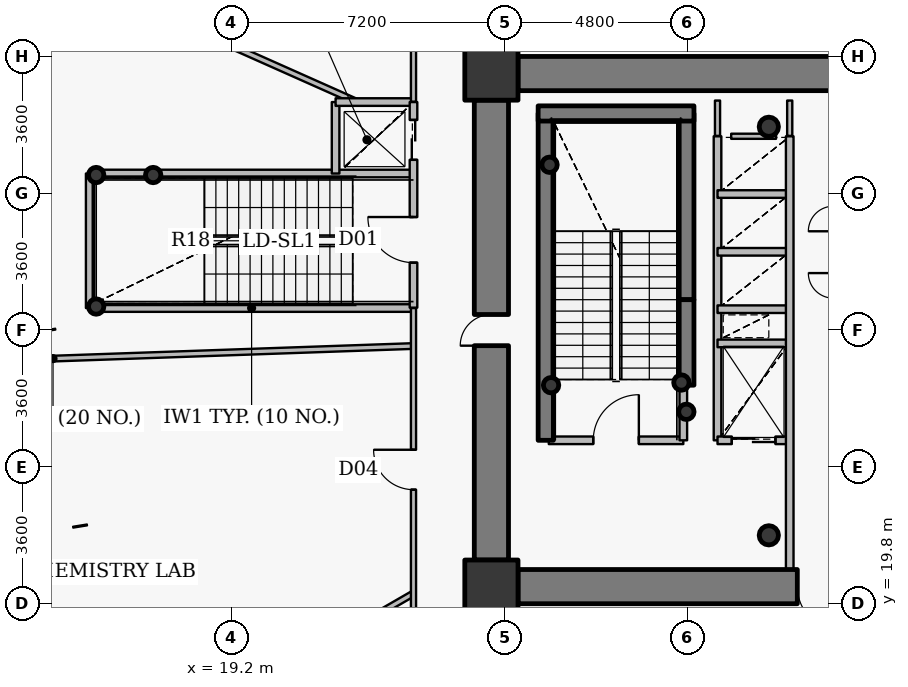
"""IFC4 building model, lengths in metres.
Left out: names, types, materials, properties, quantities, classifications, styles, units other than length and angle.
Written with IfcOpenShell. Run it as: python <this file> out.ifc"""

import sys

from ifc_helpers import new_model, si_unit, direction, frame, frame_2d, origin, origin_2d, place, context, subcontext, project, spatial, rectangle, hollow_circle, extrude, source, transform, mapped, element, fill, save


model = new_model("IFC4")
c1 = context("Model", 3, precision=1e-05, world=origin(), true_north=direction((0.0, 1.0)))
c2 = subcontext(c1, "Body", "Model", "MODEL_VIEW")
j1 = project(units=[si_unit("LENGTHUNIT", "METRE"), si_unit("PLANEANGLEUNIT", "RADIAN")], contexts=[c1])
p1 = place(None, origin())
s1 = spatial("IfcSite", under=j1, at=p1, CompositionType="ELEMENT")
p2 = place(p1, origin())
s2 = spatial("IfcBuilding", under=s1, at=p2, CompositionType="ELEMENT")
p3 = place(p2, frame((0.0, 0.0, 53.4)))
s3 = spatial("IfcBuildingStorey", under=s2, at=p3, CompositionType="ELEMENT", Elevation=53.4)
for number, where, z_axis, x_axis in (
    (1, (26.05, 20.25, 0.0), (0.0, 0.0, 1.0), (1.0, 0.0, 0.0)),
    (2, (26.05, 33.75, 0.0), (0.0, 0.0, 1.0), (1.0, 0.0, 0.0)),
):
    element("IfcColumn", number, at=place(p3, frame(where, z_axis=z_axis, x_axis=x_axis)), inside=s3, PredefinedType="COLUMN", context=c2, shape_type="SweptSolid", body=[
        extrude(rectangle(XDim=1.4, YDim=1.4, at=origin_2d()), origin(), (0.0, 0.0, 1.0), 4.2),
    ])
for number, where, z_axis, x_axis in (
    (3, (33.35, 21.6, 0.0), (0.0, 0.0, 1.0), (1.0, 0.0, 0.0)),
    (4, (33.35, 32.35, 0.0), (0.0, 0.0, 1.0), (1.0, 0.0, 0.0)),
):
    element("IfcColumn", number, at=place(p3, frame(where, z_axis=z_axis, x_axis=x_axis)), inside=s3, PredefinedType="COLUMN", context=c2, shape_type="SweptSolid", body=[
        extrude(hollow_circle(Radius=0.254, WallThickness=0.02, at=origin_2d()), origin(), (0.0, 0.0, 1.0), 4.2),
    ])
p4 = place(p3, frame((27.48, 24.1, 0.0), z_axis=(0.0, 0.0, 1.0), x_axis=(0.0, 1.0, 0.0)))
e5 = element("IfcWall", 5, at=p4, inside=s3, PredefinedType="SHEAR", context=c2, shape_type="SweptSolid", body=[
    extrude(rectangle(XDim=8.6, YDim=0.4, at=frame_2d((4.3, 0.0))), origin(), (0.0, 0.0, 1.0), 4.2),
])
p5 = place(p3, frame((31.18, 27.8, 0.0), z_axis=(0.0, 0.0, 1.0), x_axis=(0.0, 1.0, 0.0)))
e6 = element("IfcWall", 6, at=p5, inside=s3, PredefinedType="SHEAR", context=c2, shape_type="SweptSolid", body=[
    extrude(rectangle(XDim=4.9, YDim=0.4, at=frame_2d((2.45, 0.0))), origin(), (0.0, 0.0, 1.0), 4.2),
])
p6 = place(p3, frame((27.28, 32.7, 0.0), z_axis=(0.0, 0.0, 1.0), x_axis=(1.0, 0.0, 0.0)))
e7 = element("IfcWall", 7, at=p6, inside=s3, PredefinedType="SHEAR", context=c2, shape_type="SweptSolid", body=[
    extrude(rectangle(XDim=4.1, YDim=0.4, at=frame_2d((2.05, 0.0))), origin(), (0.0, 0.0, 1.0), 4.2),
])
for number, where, z_axis, x_axis in (
    (8, (27.58, 31.35, 0.0), (0.0, 0.0, 1.0), (1.0, 0.0, 0.0)),
    (9, (31.05, 25.62, 0.0), (0.0, 0.0, 1.0), (1.0, 0.0, 0.0)),
    (10, (31.18, 24.85, 0.0), (0.0, 0.0, 1.0), (1.0, 0.0, 0.0)),
    (11, (27.62, 25.55, 0.0), (0.0, 0.0, 1.0), (1.0, 0.0, 0.0)),
    (12, (15.65, 27.62, 0.0), (0.0, 0.0, 1.0), (1.0, 0.0, 0.0)),
    (13, (15.65, 31.08, 0.0), (0.0, 0.0, 1.0), (1.0, 0.0, 0.0)),
    (14, (17.15, 31.08, 0.0), (0.0, 0.0, 1.0), (1.0, 0.0, 0.0)),
):
    element("IfcColumn", number, at=place(p3, frame(where, z_axis=z_axis, x_axis=x_axis)), inside=s3, PredefinedType="COLUMN", context=c2, shape_type="SweptSolid", body=[
        extrude(hollow_circle(Radius=0.203, WallThickness=0.016, at=origin_2d()), origin(), (0.0, 0.0, 1.0), 4.2),
    ])
p7 = place(p3, frame((26.75, 33.75, 0.0), z_axis=(0.0, 0.0, 1.0), x_axis=(1.0, 0.0, 0.0)))
e15 = element("IfcWall", 15, at=p7, inside=s3, PredefinedType="SHEAR", context=c2, shape_type="SweptSolid", body=[
    extrude(rectangle(XDim=18.5, YDim=0.9, at=frame_2d((9.25, 0.0))), origin(), (0.0, 0.0, 1.0), 3.4),
])
p8 = place(p3, frame((45.25, 20.25, 0.0), z_axis=(0.0, 0.0, 1.0), x_axis=(-1.0, 0.0, 0.0)))
e16 = element("IfcWall", 16, at=p8, inside=s3, PredefinedType="SHEAR", context=c2, shape_type="SweptSolid", body=[
    extrude(rectangle(XDim=18.5, YDim=0.9, at=frame_2d((9.25, 0.0))), origin(), (0.0, 0.0, 1.0), 3.4),
])
p9 = place(p8, frame((10.0, 0.0, 0.0)))
e17 = element("IfcOpeningElement", 17, at=p9, cuts=e16, PredefinedType="OPENING", context=c2, shape_type="SweptSolid", body=[
    extrude(rectangle(XDim=1.15, YDim=2.15, at=origin_2d()), frame((0.575, 0.46, 1.075), z_axis=(0.0, -1.0, 0.0), x_axis=(1.0, 0.0, 0.0)), (0.0, 0.0, 1.0), 0.92),
])
p10 = place(p3, frame((26.05, 20.95, 0.0), z_axis=(0.0, 0.0, 1.0), x_axis=(0.0, 1.0, 0.0)))
e18 = element("IfcWall", 18, at=p10, inside=s3, PredefinedType="SHEAR", context=c2, shape_type="SweptSolid", body=[
    extrude(rectangle(XDim=12.1, YDim=0.9, at=frame_2d((6.05, 0.0))), origin(), (0.0, 0.0, 1.0), 3.4),
])
p11 = place(p10, frame((5.64, 0.0, 0.0)))
e19 = element("IfcOpeningElement", 19, at=p11, cuts=e18, PredefinedType="OPENING", context=c2, shape_type="SweptSolid", body=[
    extrude(rectangle(XDim=0.82, YDim=2.1, at=origin_2d()), frame((0.41, 0.46, 1.05), z_axis=(0.0, -1.0, 0.0), x_axis=(1.0, 0.0, 0.0)), (0.0, 0.0, 1.0), 0.92),
])
p12 = place(p3, frame((31.18, 25.55, 0.0), z_axis=(0.0, 0.0, 1.0), x_axis=(0.0, 1.0, 0.0)))
e20 = element("IfcWall", 20, at=p12, inside=s3, PredefinedType="SHEAR", context=c2, shape_type="SweptSolid", body=[
    extrude(rectangle(XDim=2.25, YDim=0.4, at=frame_2d((1.125, 0.0))), origin(), (0.0, 0.0, 1.0), 3.55),
])
p13 = place(p3, frame((5.029, 25.918, 0.0), z_axis=(0.0, 0.0, 1.0), x_axis=(0.99939062663, 0.034905234611, 0.0)))
e21 = element("IfcWall", 21, at=p13, inside=s3, PredefinedType="PARTITIONING", context=c2, shape_type="SweptSolid", body=[
    extrude(rectangle(XDim=18.983, YDim=0.15, at=frame_2d((9.491, 0.0))), origin(), (0.0, 0.0, 1.0), 3.335),
])
p14 = place(p3, frame((9.06, 38.995, 0.0), z_axis=(0.0, 0.0, 1.0), x_axis=(0.913544945328, -0.406737793751, 0.0)))
e22 = element("IfcWall", 22, at=p14, inside=s3, PredefinedType="PARTITIONING", context=c2, shape_type="SweptSolid", body=[
    extrude(rectangle(XDim=14.738, YDim=0.15, at=frame_2d((7.369, 0.0))), origin(), (0.0, 0.0, 1.0), 3.335),
])
p15 = place(p14, frame((6.844, 0.0, 0.0)))
e23 = element("IfcOpeningElement", 23, at=p15, cuts=e22, PredefinedType="OPENING", context=c2, shape_type="SweptSolid", body=[
    extrude(rectangle(XDim=1.05, YDim=2.15, at=origin_2d()), frame((0.525, 0.085, 1.075), z_axis=(0.0, -1.0, 0.0), x_axis=(1.0, 0.0, 0.0)), (0.0, 0.0, 1.0), 0.17),
])
p16 = place(p3, frame((11.01, 12.572, 0.0), z_axis=(0.0, 0.0, 1.0), x_axis=(0.86602186862, 0.500006123034, 0.0)))
e24 = element("IfcWall", 24, at=p16, inside=s3, PredefinedType="PARTITIONING", context=c2, shape_type="SweptSolid", body=[
    extrude(rectangle(XDim=14.999, YDim=0.15, at=frame_2d((7.5, 0.0))), origin(), (0.0, 0.0, 1.0), 3.335),
])
p17 = place(p3, frame((15.48, 27.58, 0.0), z_axis=(0.0, 0.0, 1.0), x_axis=(0.0, 1.0, 0.0)))
e25 = element("IfcWall", 25, at=p17, inside=s3, PredefinedType="PARTITIONING", context=c2, shape_type="SweptSolid", body=[
    extrude(rectangle(XDim=3.54, YDim=0.2, at=frame_2d((1.77, 0.0))), origin(), (0.0, 0.0, 1.0), 3.95),
])
for number, where, z_axis, x_axis in (
    (26, (15.48, 27.58, 0.0), (0.0, 0.0, 1.0), (1.0, 0.0, 0.0)),
    (27, (15.48, 31.12, 0.0), (0.0, 0.0, 1.0), (1.0, 0.0, 0.0)),
):
    element("IfcWall", number, at=place(p3, frame(where, z_axis=z_axis, x_axis=x_axis)), inside=s3, PredefinedType="PARTITIONING", context=c2, shape_type="SweptSolid", body=[
        extrude(rectangle(XDim=8.52, YDim=0.2, at=frame_2d((4.26, 0.0))), origin(), (0.0, 0.0, 1.0), 3.95),
    ])
p18 = place(p3, frame((21.95, 31.12, 0.0), z_axis=(0.0, 0.0, 1.0), x_axis=(0.0, 1.0, 0.0)))
e28 = element("IfcWall", 28, at=p18, inside=s3, PredefinedType="PARTITIONING", context=c2, shape_type="SweptSolid", body=[
    extrude(rectangle(XDim=1.88, YDim=0.2, at=frame_2d((0.94, 0.0))), origin(), (0.0, 0.0, 1.0), 3.285),
])
p19 = place(p3, frame((21.95, 33.0, 0.0), z_axis=(0.0, 0.0, 1.0), x_axis=(1.0, 0.0, 0.0)))
e29 = element("IfcWall", 29, at=p19, inside=s3, PredefinedType="PARTITIONING", context=c2, shape_type="SweptSolid", body=[
    extrude(rectangle(XDim=2.05, YDim=0.2, at=frame_2d((1.025, 0.0))), origin(), (0.0, 0.0, 1.0), 3.95),
])
p20 = place(p3, frame((24.0, 14.8, 0.0), z_axis=(0.0, 0.0, 1.0), x_axis=(0.0, 1.0, 0.0)))
e30 = element("IfcWall", 30, at=p20, inside=s3, PredefinedType="PARTITIONING", context=c2, shape_type="SweptSolid", body=[
    extrude(rectangle(XDim=12.78, YDim=0.135, at=frame_2d((6.39, 0.0))), origin(), (0.0, 0.0, 1.0), 3.285),
])
p21 = place(p20, frame((8.001, 0.0, 0.0)))
e31 = element("IfcOpeningElement", 31, at=p21, cuts=e30, PredefinedType="OPENING", context=c2, shape_type="SweptSolid", body=[
    extrude(rectangle(XDim=1.05, YDim=2.15, at=origin_2d()), frame((0.525, 0.078, 1.075), z_axis=(0.0, -1.0, 0.0), x_axis=(1.0, 0.0, 0.0)), (0.0, 0.0, 1.0), 0.155),
])
p22 = place(p20, frame((2.131, 0.0, 0.0)))
e32 = element("IfcOpeningElement", 32, at=p22, cuts=e30, PredefinedType="OPENING", context=c2, shape_type="SweptSolid", body=[
    extrude(rectangle(XDim=1.05, YDim=2.15, at=origin_2d()), frame((0.525, 0.078, 1.075), z_axis=(0.0, -1.0, 0.0), x_axis=(1.0, 0.0, 0.0)), (0.0, 0.0, 1.0), 0.155),
])
p23 = place(p3, frame((24.0, 27.59, 0.0), z_axis=(0.0, 0.0, 1.0), x_axis=(0.0, 1.0, 0.0)))
e33 = element("IfcWall", 33, at=p23, inside=s3, PredefinedType="PARTITIONING", context=c2, shape_type="SweptSolid", body=[
    extrude(rectangle(XDim=5.41, YDim=0.2, at=frame_2d((2.705, 0.0))), origin(), (0.0, 0.0, 1.0), 3.285),
])
p24 = place(p23, frame((1.185, 0.0, 0.0)))
e34 = element("IfcOpeningElement", 34, at=p24, cuts=e33, PredefinedType="OPENING", context=c2, shape_type="SweptSolid", body=[
    extrude(rectangle(XDim=1.2, YDim=2.15, at=origin_2d()), frame((0.6, 0.11, 1.075), z_axis=(0.0, -1.0, 0.0), x_axis=(1.0, 0.0, 0.0)), (0.0, 0.0, 1.0), 0.22),
])
p25 = place(p23, frame((3.89, 0.0, 0.0)))
e35 = element("IfcOpeningElement", 35, at=p25, cuts=e33, PredefinedType="OPENING", context=c2, shape_type="SweptSolid", body=[
    extrude(rectangle(XDim=1.05, YDim=2.15, at=origin_2d()), frame((0.525, 0.11, 1.075), z_axis=(0.0, -1.0, 0.0), x_axis=(1.0, 0.0, 0.0)), (0.0, 0.0, 1.0), 0.22),
])
p26 = place(p3, frame((24.0, 33.01, 0.0), z_axis=(0.0, 0.0, 1.0), x_axis=(0.0, 1.0, 0.0)))
e36 = element("IfcWall", 36, at=p26, inside=s3, PredefinedType="PARTITIONING", context=c2, shape_type="SweptSolid", body=[
    extrude(rectangle(XDim=8.19, YDim=0.135, at=frame_2d((4.095, 0.0))), origin(), (0.0, 0.0, 1.0), 3.285),
])
p27 = place(p26, frame((3.57, 0.0, 0.0)))
e37 = element("IfcOpeningElement", 37, at=p27, cuts=e36, PredefinedType="OPENING", context=c2, shape_type="SweptSolid", body=[
    extrude(rectangle(XDim=1.05, YDim=2.15, at=origin_2d()), frame((0.525, 0.078, 1.075), z_axis=(0.0, -1.0, 0.0), x_axis=(1.0, 0.0, 0.0)), (0.0, 0.0, 1.0), 0.155),
])
p28 = place(p3, frame((27.56, 24.1, 0.0), z_axis=(0.0, 0.0, 1.0), x_axis=(1.0, 0.0, 0.0)))
e38 = element("IfcWall", 38, at=p28, inside=s3, PredefinedType="PARTITIONING", context=c2, shape_type="SweptSolid", body=[
    extrude(rectangle(XDim=3.54, YDim=0.2, at=frame_2d((1.77, 0.0))), origin(), (0.0, 0.0, 1.0), 3.95),
])
p29 = place(p28, frame((1.17, 0.0, 0.0)))
e39 = element("IfcOpeningElement", 39, at=p29, cuts=e38, PredefinedType="OPENING", context=c2, shape_type="SweptSolid", body=[
    extrude(rectangle(XDim=1.2, YDim=2.15, at=origin_2d()), frame((0.6, 0.11, 1.075), z_axis=(0.0, -1.0, 0.0), x_axis=(1.0, 0.0, 0.0)), (0.0, 0.0, 1.0), 0.22),
])
p30 = place(p3, frame((31.1, 24.1, 0.0), z_axis=(0.0, 0.0, 1.0), x_axis=(0.0, 1.0, 0.0)))
e40 = element("IfcWall", 40, at=p30, inside=s3, PredefinedType="PARTITIONING", context=c2, shape_type="SweptSolid", body=[
    extrude(rectangle(XDim=1.44, YDim=0.2, at=frame_2d((0.72, 0.0))), origin(), (0.0, 0.0, 1.0), 3.95),
])
p31 = place(p3, frame((32.0, 24.1, 0.0), z_axis=(0.0, 0.0, 1.0), x_axis=(0.0, 1.0, 0.0)))
e41 = element("IfcWall", 41, at=p31, inside=s3, PredefinedType="PARTITIONING", context=c2, shape_type="SweptSolid", body=[
    extrude(rectangle(XDim=8.0, YDim=0.2, at=frame_2d((4.0, 0.0))), origin(), (0.0, 0.0, 1.0), 3.95),
])
p32 = place(p3, frame((32.0, 24.1, 0.0), z_axis=(0.0, 0.0, 1.0), x_axis=(1.0, 0.0, 0.0)))
e42 = element("IfcWall", 42, at=p32, inside=s3, PredefinedType="PARTITIONING", context=c2, shape_type="SweptSolid", body=[
    extrude(rectangle(XDim=1.9, YDim=0.2, at=frame_2d((0.95, 0.0))), origin(), (0.0, 0.0, 1.0), 3.535),
])
p33 = place(p32, frame((0.375, 0.0, 0.0)))
e43 = element("IfcOpeningElement", 43, at=p33, cuts=e42, PredefinedType="OPENING", context=c2, shape_type="SweptSolid", body=[
    extrude(rectangle(XDim=1.15, YDim=2.15, at=origin_2d()), frame((0.575, 0.11, 1.075), z_axis=(0.0, -1.0, 0.0), x_axis=(1.0, 0.0, 0.0)), (0.0, 0.0, 1.0), 0.22),
])
for number, where, z_axis, x_axis in (
    (44, (32.0, 26.65, 0.0), (0.0, 0.0, 1.0), (1.0, 0.0, 0.0)),
    (45, (32.0, 27.55, 0.0), (0.0, 0.0, 1.0), (1.0, 0.0, 0.0)),
    (46, (32.0, 29.06, 0.0), (0.0, 0.0, 1.0), (1.0, 0.0, 0.0)),
    (47, (32.0, 30.58, 0.0), (0.0, 0.0, 1.0), (1.0, 0.0, 0.0)),
):
    element("IfcWall", number, at=place(p3, frame(where, z_axis=z_axis, x_axis=x_axis)), inside=s3, PredefinedType="PARTITIONING", context=c2, shape_type="SweptSolid", body=[
        extrude(rectangle(XDim=1.9, YDim=0.2, at=frame_2d((0.95, 0.0))), origin(), (0.0, 0.0, 1.0), 3.535),
    ])
p34 = place(p3, frame((33.9, 20.7, 0.0), z_axis=(0.0, 0.0, 1.0), x_axis=(0.0, 1.0, 0.0)))
e48 = element("IfcWall", 48, at=p34, inside=s3, PredefinedType="PARTITIONING", context=c2, shape_type="SweptSolid", body=[
    extrude(rectangle(XDim=11.4, YDim=0.2, at=frame_2d((5.7, 0.0))), origin(), (0.0, 0.0, 1.0), 3.535),
])
p35 = place(p3, frame((32.36, 32.1, 0.0), z_axis=(0.0, 0.0, 1.0), x_axis=(1.0, 0.0, 0.0)))
e49 = element("IfcWall", 49, at=p35, inside=s3, PredefinedType="PARTITIONING", context=c2, shape_type="SweptSolid", body=[
    extrude(rectangle(XDim=1.18, YDim=0.135, at=frame_2d((0.59, 0.0))), origin(), (0.0, 0.0, 1.0), 3.535),
])
p36 = place(p3, frame((32.0, 33.04, 0.0), z_axis=(0.0, 0.0, 1.0), x_axis=(0.0, -1.0, 0.0)))
e50 = element("IfcWall", 50, at=p36, inside=s3, PredefinedType="PARTITIONING", context=c2, shape_type="SweptSolid", body=[
    extrude(rectangle(XDim=0.93, YDim=0.135, at=frame_2d((0.465, 0.0))), origin(), (0.0, 0.0, 1.0), 3.485),
])
p37 = place(p3, frame((33.9, 32.11, 0.0), z_axis=(0.0, 0.0, 1.0), x_axis=(0.0, 1.0, 0.0)))
e51 = element("IfcWall", 51, at=p37, inside=s3, PredefinedType="PARTITIONING", context=c2, shape_type="SweptSolid", body=[
    extrude(rectangle(XDim=0.93, YDim=0.135, at=frame_2d((0.465, 0.0))), origin(), (0.0, 0.0, 1.0), 3.535),
])
p38 = place(p3, frame((25.95, 38.893, 0.0), z_axis=(0.0, 0.0, 1.0), x_axis=(0.0, -1.0, 0.0)))
e52 = element("IfcWall", 52, at=p38, inside=s3, PredefinedType="PARTITIONING", context=c2, shape_type="SweptSolid", body=[
    extrude(rectangle(XDim=4.693, YDim=0.135, at=frame_2d((2.346, 0.0))), origin(), (0.0, 0.0, 1.0), 3.285),
])
for number, where, z_axis, x_axis in (
    (53, (25.6, 34.2, 0.0), (0.0, 0.0, 1.0), (0.0, -1.0, 0.0)),
    (54, (25.6, 20.94, 0.0), (0.0, 0.0, 1.0), (0.0, -1.0, 0.0)),
):
    element("IfcWall", number, at=place(p3, frame(where, z_axis=z_axis, x_axis=x_axis)), inside=s3, PredefinedType="PARTITIONING", context=c2, shape_type="SweptSolid", body=[
        extrude(rectangle(XDim=1.14, YDim=0.135, at=frame_2d((0.57, 0.0))), origin(), (0.0, 0.0, 1.0), 3.95),
    ])
p39 = place(p3, frame((25.907, 19.8, 0.0), z_axis=(0.0, 0.0, 1.0), x_axis=(1.0, 0.0, 0.0)))
e55 = element("IfcWall", 55, at=p39, inside=s3, PredefinedType="PARTITIONING", context=c2, shape_type="SweptSolid", body=[
    extrude(rectangle(XDim=0.833, YDim=0.135, at=frame_2d((0.416, 0.0))), origin(), (0.0, 0.0, 1.0), 3.285),
])
m1 = source(origin(), c2, "Body", "SweptSolid", [
    extrude(rectangle(XDim=0.82, YDim=2.1, at=origin_2d()), frame((0.41, 0.025, 1.05), z_axis=(0.0, -1.0, 0.0), x_axis=(1.0, 0.0, 0.0)), (0.0, 0.0, 1.0), 0.05),
])
p40 = place(p11, origin())
e56 = element("IfcDoor", 56, at=p40, inside=s3, OperationType="SINGLE_SWING_LEFT", PredefinedType="DOOR", context=c2, shape_type="MappedRepresentation", body=[
    mapped(m1, transform((0.0, 0.0, 0.0), x_axis=(1.0, 0.0, 0.0), y_axis=(0.0, 1.0, 0.0), z_axis=(0.0, 0.0, 1.0), scale=1.0)),
])
fill(e19, e56)
m2 = source(origin(), c2, "Body", "SweptSolid", [
    extrude(rectangle(XDim=1.15, YDim=2.15, at=origin_2d()), frame((0.575, 0.025, 1.075), z_axis=(0.0, -1.0, 0.0), x_axis=(1.0, 0.0, 0.0)), (0.0, 0.0, 1.0), 0.05),
])
p41 = place(p9, origin())
e57 = element("IfcDoor", 57, at=p41, inside=s3, OperationType="SINGLE_SWING_LEFT", PredefinedType="DOOR", context=c2, shape_type="MappedRepresentation", body=[
    mapped(m2, transform((0.0, 0.0, 0.0), x_axis=(1.0, 0.0, 0.0), y_axis=(0.0, 1.0, 0.0), z_axis=(0.0, 0.0, 1.0), scale=1.0)),
])
fill(e17, e57)
m3 = source(origin(), c2, "Body", "SweptSolid", [
    extrude(rectangle(XDim=1.2, YDim=2.15, at=origin_2d()), frame((0.6, 0.025, 1.075), z_axis=(0.0, -1.0, 0.0), x_axis=(1.0, 0.0, 0.0)), (0.0, 0.0, 1.0), 0.05),
])
p42 = place(p29, origin())
e58 = element("IfcDoor", 58, at=p42, inside=s3, OperationType="SINGLE_SWING_RIGHT", PredefinedType="DOOR", context=c2, shape_type="MappedRepresentation", body=[
    mapped(m3, transform((0.0, 0.0, 0.0), x_axis=(1.0, 0.0, 0.0), y_axis=(0.0, 1.0, 0.0), z_axis=(0.0, 0.0, 1.0), scale=1.0)),
])
fill(e39, e58)
p43 = place(p24, origin())
e59 = element("IfcDoor", 59, at=p43, inside=s3, OperationType="SINGLE_SWING_RIGHT", PredefinedType="DOOR", context=c2, shape_type="MappedRepresentation", body=[
    mapped(m3, transform((0.0, 0.0, 0.0), x_axis=(1.0, 0.0, 0.0), y_axis=(0.0, 1.0, 0.0), z_axis=(0.0, 0.0, 1.0), scale=1.0)),
])
fill(e34, e59)
m4 = source(origin(), c2, "Body", "SweptSolid", [
    extrude(rectangle(XDim=1.15, YDim=2.15, at=origin_2d()), frame((0.575, 0.025, 1.075), z_axis=(0.0, -1.0, 0.0), x_axis=(1.0, 0.0, 0.0)), (0.0, 0.0, 1.0), 0.05),
])
p44 = place(p33, origin())
e60 = element("IfcDoor", 60, at=p44, inside=s3, OperationType="DOUBLE_DOOR_SLIDING", PredefinedType="USERDEFINED", context=c2, shape_type="MappedRepresentation", body=[
    mapped(m4, transform((0.0, 0.0, 0.0), x_axis=(1.0, 0.0, 0.0), y_axis=(0.0, 1.0, 0.0), z_axis=(0.0, 0.0, 1.0), scale=1.0)),
])
fill(e43, e60)
m5 = source(origin(), c2, "Body", "SweptSolid", [
    extrude(rectangle(XDim=1.05, YDim=2.15, at=origin_2d()), frame((0.525, 0.025, 1.075), z_axis=(0.0, -1.0, 0.0), x_axis=(1.0, 0.0, 0.0)), (0.0, 0.0, 1.0), 0.05),
])
p45 = place(p25, origin())
e61 = element("IfcDoor", 61, at=p45, inside=s3, OperationType="DOUBLE_DOOR_SLIDING", PredefinedType="USERDEFINED", context=c2, shape_type="MappedRepresentation", body=[
    mapped(m5, transform((0.0, 0.0, 0.0), x_axis=(1.0, 0.0, 0.0), y_axis=(0.0, 1.0, 0.0), z_axis=(0.0, 0.0, 1.0), scale=1.0)),
])
fill(e35, e61)
m6 = source(origin(), c2, "Body", "SweptSolid", [
    extrude(rectangle(XDim=1.05, YDim=2.15, at=origin_2d()), frame((0.525, 0.025, 1.075), z_axis=(0.0, -1.0, 0.0), x_axis=(1.0, 0.0, 0.0)), (0.0, 0.0, 1.0), 0.05),
])
p46 = place(p21, origin())
e62 = element("IfcDoor", 62, at=p46, inside=s3, OperationType="SINGLE_SWING_RIGHT", PredefinedType="DOOR", context=c2, shape_type="MappedRepresentation", body=[
    mapped(m6, transform((0.0, 0.0, 0.0), x_axis=(1.0, 0.0, 0.0), y_axis=(0.0, 1.0, 0.0), z_axis=(0.0, 0.0, 1.0), scale=1.0)),
])
fill(e31, e62)
save(model, sys.argv[1])
